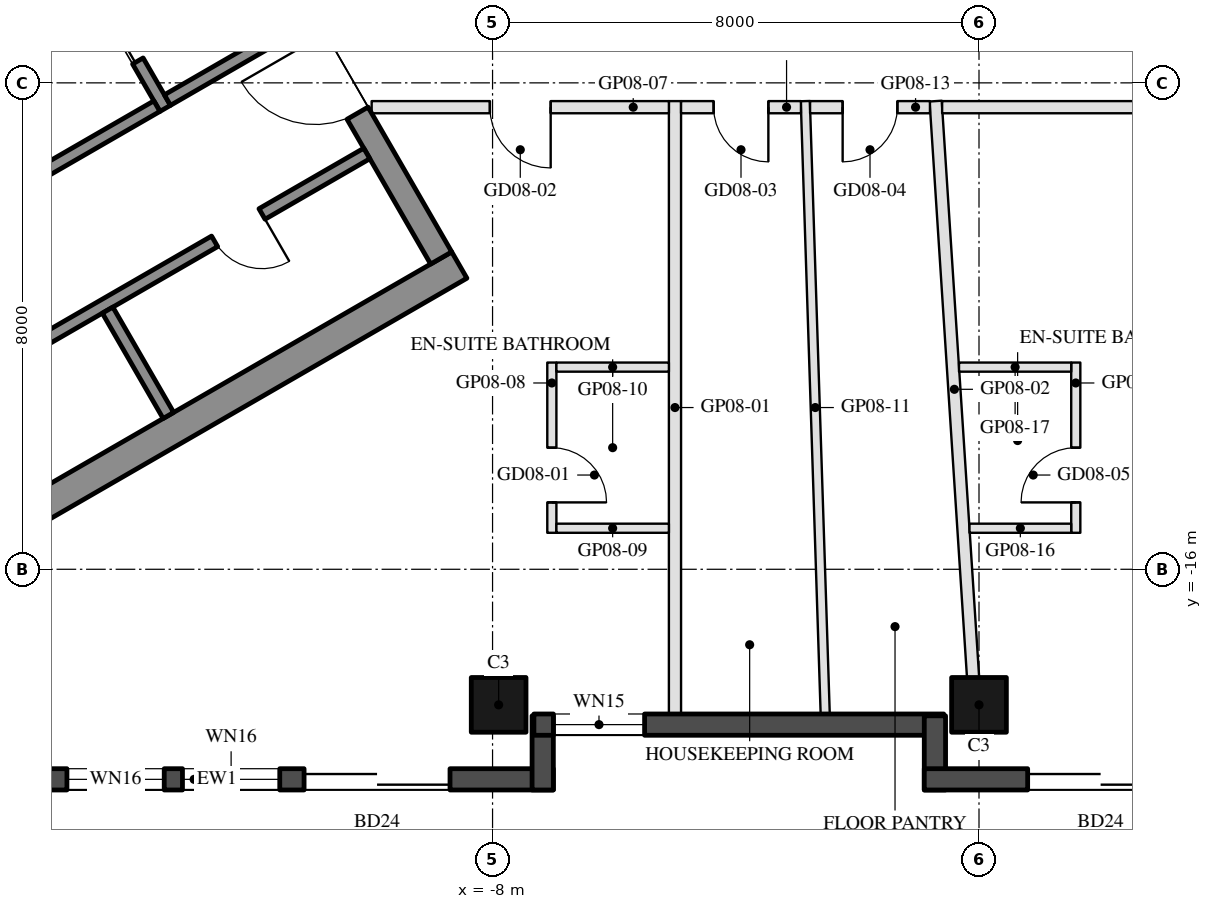
"""IFC4 building model, lengths in metres.
Left out: names, types, materials, properties, quantities, classifications, styles, units other than length and angle.
Written with IfcOpenShell. Run it as: python <this file> out.ifc"""

import sys

from ifc_helpers import new_model, si_unit, direction, frame, frame_2d, origin, origin_2d, place, context, subcontext, project, spatial, rectangle, hollow_rectangle, extrude, element, fill, save


model = new_model("IFC4")
c1 = context("Model", 3, precision=1e-05, world=origin(), true_north=direction((0.0, 1.0)))
c2 = subcontext(c1, "Body", "Model", "MODEL_VIEW")
j1 = project(units=[si_unit("LENGTHUNIT", "METRE"), si_unit("PLANEANGLEUNIT", "RADIAN")], contexts=[c1])
p1 = place(None, origin())
s1 = spatial("IfcSite", under=j1, at=p1, CompositionType="ELEMENT")
p2 = place(p1, origin())
s2 = spatial("IfcBuilding", under=s1, at=p2, CompositionType="ELEMENT")
p3 = place(p2, frame((0.0, 0.0, 105.7)))
s3 = spatial("IfcBuildingStorey", under=s2, at=p3, CompositionType="ELEMENT", Elevation=105.7)
for number, where, z_axis, x_axis in (
    (1, (-7.9, -18.23, 0.0), (0.0, 0.0, 1.0), (-1.0, 0.0, 0.0)),
    (2, (0.0, -18.23, 0.0), (0.0, 0.0, 1.0), (-1.0, 0.0, 0.0)),
):
    element("IfcColumn", number, at=place(p3, frame(where, z_axis=z_axis, x_axis=x_axis)), inside=s3, PredefinedType="COLUMN", context=c2, shape_type="SweptSolid", body=[
        extrude(hollow_rectangle(XDim=0.9, YDim=0.9, WallThickness=0.04, at=origin_2d()), origin(), (0.0, 0.0, 1.0), 3.7),
    ])
p4 = place(p3, frame((-18.816, -19.455, 0.0), z_axis=(0.0, 0.0, 1.0), x_axis=(1.0, 0.0, 0.0)))
e3 = element("IfcWall", 3, at=p4, inside=s3, PredefinedType="SOLIDWALL", context=c2, shape_type="SweptSolid", body=[
    extrude(rectangle(XDim=11.816, YDim=0.35, at=frame_2d((5.908, 0.0))), origin(), (0.0, 0.0, 1.0), 3.55),
])
p5 = place(p4, frame((0.381, 0.0, 0.3)))
e4 = element("IfcOpeningElement", 4, at=p5, cuts=e3, PredefinedType="OPENING", context=c2, shape_type="SweptSolid", body=[
    extrude(rectangle(XDim=1.8, YDim=2.65, at=frame_2d((0.9, 1.325))), frame((0.0, 0.185, 0.0), z_axis=(0.0, -1.0, 0.0), x_axis=(1.0, 0.0, 0.0)), (0.0, 0.0, 1.0), 0.37),
])
p6 = place(p4, frame((7.716, 0.0, 0.0)))
e5 = element("IfcOpeningElement", 5, at=p6, cuts=e3, PredefinedType="OPENING", context=c2, shape_type="SweptSolid", body=[
    extrude(rectangle(XDim=2.4, YDim=2.4, at=frame_2d((1.2, 1.2))), frame((0.0, 0.185, 0.0), z_axis=(0.0, -1.0, 0.0), x_axis=(1.0, 0.0, 0.0)), (0.0, 0.0, 1.0), 0.37),
])
p7 = place(p4, frame((3.816, 0.0, 0.3)))
e6 = element("IfcOpeningElement", 6, at=p7, cuts=e3, PredefinedType="OPENING", context=c2, shape_type="SweptSolid", body=[
    extrude(rectangle(XDim=1.6, YDim=2.65, at=frame_2d((0.8, 1.325))), frame((0.0, 0.185, 0.0), z_axis=(0.0, -1.0, 0.0), x_axis=(1.0, 0.0, 0.0)), (0.0, 0.0, 1.0), 0.37),
])
p8 = place(p4, frame((5.716, 0.0, 0.3)))
e7 = element("IfcOpeningElement", 7, at=p8, cuts=e3, PredefinedType="OPENING", context=c2, shape_type="SweptSolid", body=[
    extrude(rectangle(XDim=1.6, YDim=2.65, at=frame_2d((0.8, 1.325))), frame((0.0, 0.185, 0.0), z_axis=(0.0, -1.0, 0.0), x_axis=(1.0, 0.0, 0.0)), (0.0, 0.0, 1.0), 0.37),
])
p9 = place(p3, frame((-7.175, -19.63, 0.0), z_axis=(0.0, 0.0, 1.0), x_axis=(0.0, 1.0, 0.0)))
e8 = element("IfcWall", 8, at=p9, inside=s3, PredefinedType="SOLIDWALL", context=c2, shape_type="SweptSolid", body=[
    extrude(rectangle(XDim=1.22, YDim=0.35, at=frame_2d((0.61, 0.0))), origin(), (0.0, 0.0, 1.0), 3.55),
])
p10 = place(p3, frame((-7.32, -18.555, 0.0), z_axis=(0.0, 0.0, 1.0), x_axis=(1.0, 0.0, 0.0)))
e9 = element("IfcWall", 9, at=p10, inside=s3, PredefinedType="SOLIDWALL", context=c2, shape_type="SweptSolid", body=[
    extrude(rectangle(XDim=6.74, YDim=0.35, at=frame_2d((3.37, 0.0))), origin(), (0.0, 0.0, 1.0), 3.55),
])
p11 = place(p10, frame((0.32, 0.0, 0.3)))
e10 = element("IfcOpeningElement", 10, at=p11, cuts=e9, PredefinedType="OPENING", context=c2, shape_type="SweptSolid", body=[
    extrude(rectangle(XDim=1.5, YDim=2.65, at=frame_2d((0.75, 1.325))), frame((0.0, 0.185, 0.0), z_axis=(0.0, -1.0, 0.0), x_axis=(1.0, 0.0, 0.0)), (0.0, 0.0, 1.0), 0.37),
])
p12 = place(p3, frame((-0.725, -18.41, 0.0), z_axis=(0.0, 0.0, 1.0), x_axis=(0.0, -1.0, 0.0)))
e11 = element("IfcWall", 11, at=p12, inside=s3, PredefinedType="SOLIDWALL", context=c2, shape_type="SweptSolid", body=[
    extrude(rectangle(XDim=1.22, YDim=0.35, at=frame_2d((0.61, 0.0))), origin(), (0.0, 0.0, 1.0), 3.55),
])
p13 = place(p3, frame((-0.9, -19.455, 0.0), z_axis=(0.0, 0.0, 1.0), x_axis=(1.0, 0.0, 0.0)))
e12 = element("IfcWall", 12, at=p13, inside=s3, PredefinedType="SOLIDWALL", context=c2, shape_type="SweptSolid", body=[
    extrude(rectangle(XDim=9.7, YDim=0.35, at=frame_2d((4.85, 0.0))), origin(), (0.0, 0.0, 1.0), 3.55),
])
p14 = place(p13, frame((1.7, 0.0, 0.0)))
e13 = element("IfcOpeningElement", 13, at=p14, cuts=e12, PredefinedType="OPENING", context=c2, shape_type="SweptSolid", body=[
    extrude(rectangle(XDim=2.4, YDim=2.4, at=frame_2d((1.2, 1.2))), frame((0.0, 0.185, 0.0), z_axis=(0.0, -1.0, 0.0), x_axis=(1.0, 0.0, 0.0)), (0.0, 0.0, 1.0), 0.37),
])
p15 = place(p13, frame((4.4, 0.0, 0.3)))
e14 = element("IfcOpeningElement", 14, at=p15, cuts=e12, PredefinedType="OPENING", context=c2, shape_type="SweptSolid", body=[
    extrude(rectangle(XDim=1.6, YDim=2.65, at=frame_2d((0.8, 1.325))), frame((0.0, 0.185, 0.0), z_axis=(0.0, -1.0, 0.0), x_axis=(1.0, 0.0, 0.0)), (0.0, 0.0, 1.0), 0.37),
])
p16 = place(p13, frame((6.3, 0.0, 0.3)))
e15 = element("IfcOpeningElement", 15, at=p16, cuts=e12, PredefinedType="OPENING", context=c2, shape_type="SweptSolid", body=[
    extrude(rectangle(XDim=1.6, YDim=2.65, at=frame_2d((0.8, 1.325))), frame((0.0, 0.185, 0.0), z_axis=(0.0, -1.0, 0.0), x_axis=(1.0, 0.0, 0.0)), (0.0, 0.0, 1.0), 0.37),
])
for number, where, z_axis, x_axis in (
    (16, (-13.797, -1.903, 0.0), (0.0, 0.0, 1.0), (-0.866, -0.5, 0.0)),
    (17, (-8.547, -10.997, 0.0), (0.0, 0.0, 1.0), (-0.866, -0.5, 0.0)),
):
    element("IfcWall", number, at=place(p3, frame(where, z_axis=z_axis, x_axis=x_axis)), inside=s3, PredefinedType="SHEAR", context=c2, shape_type="SweptSolid", body=[
        extrude(rectangle(XDim=14.837, YDim=0.5, at=frame_2d((7.418, 0.0))), origin(), (0.0, 0.0, 1.0), 3.5),
    ])
p17 = place(p3, frame((-13.845, -2.22, 0.0), z_axis=(0.0, 0.0, 1.0), x_axis=(0.500004234368, -0.866022959057, 0.0)))
e18 = element("IfcWall", 18, at=p17, inside=s3, PredefinedType="SHEAR", context=c2, shape_type="SweptSolid", body=[
    extrude(rectangle(XDim=10.0, YDim=0.4, at=frame_2d((5.0, 0.0))), origin(), (0.0, 0.0, 1.0), 3.5),
])
p18 = place(p17, frame((3.55, 0.0, 0.0)))
e19 = element("IfcOpeningElement", 19, at=p18, cuts=e18, PredefinedType="OPENING", context=c2, shape_type="SweptSolid", body=[
    extrude(rectangle(XDim=1.1, YDim=2.1, at=frame_2d((0.55, 1.05))), frame((0.0, 0.21, 0.0), z_axis=(0.0, -1.0, 0.0), x_axis=(1.0, 0.0, 0.0)), (0.0, 0.0, 1.0), 0.42),
])
p19 = place(p17, frame((5.85, 0.0, 0.0)))
e20 = element("IfcOpeningElement", 20, at=p19, cuts=e18, PredefinedType="OPENING", context=c2, shape_type="SweptSolid", body=[
    extrude(rectangle(XDim=1.4, YDim=2.1, at=frame_2d((0.7, 1.05))), frame((0.0, 0.21, 0.0), z_axis=(0.0, -1.0, 0.0), x_axis=(1.0, 0.0, 0.0)), (0.0, 0.0, 1.0), 0.42),
])
p20 = place(p3, frame((-12.681, -4.636, 0.0), z_axis=(0.0, 0.0, 1.0), x_axis=(-0.866021702275, -0.500006411147, 0.0)))
e21 = element("IfcWall", 21, at=p20, inside=s3, PredefinedType="SHEAR", context=c2, shape_type="SweptSolid", body=[
    extrude(rectangle(XDim=6.45, YDim=0.25, at=frame_2d((3.225, 0.0))), origin(), (0.0, 0.0, 1.0), 3.5),
])
p21 = place(p20, frame((0.3, 0.0, 0.0)))
e22 = element("IfcOpeningElement", 22, at=p21, cuts=e21, PredefinedType="OPENING", context=c2, shape_type="SweptSolid", body=[
    extrude(rectangle(XDim=1.0, YDim=2.1, at=frame_2d((0.5, 1.05))), frame((0.0, 0.135, 0.0), z_axis=(0.0, -1.0, 0.0), x_axis=(1.0, 0.0, 0.0)), (0.0, 0.0, 1.0), 0.27),
])
p22 = place(p3, frame((-14.783, -5.995, 0.0), z_axis=(0.0, 0.0, 1.0), x_axis=(0.49994636267, -0.866056369097, 0.0)))
e23 = element("IfcWall", 23, at=p22, inside=s3, PredefinedType="SHEAR", context=c2, shape_type="SweptSolid", body=[
    extrude(rectangle(XDim=2.8, YDim=0.2, at=frame_2d((1.4, 0.0))), origin(), (0.0, 0.0, 1.0), 3.5),
])
p23 = place(p22, frame((0.7, 0.0, 0.0)))
e24 = element("IfcOpeningElement", 24, at=p23, cuts=e23, PredefinedType="OPENING", context=c2, shape_type="SweptSolid", body=[
    extrude(rectangle(XDim=1.2, YDim=2.1, at=frame_2d((0.6, 1.05))), frame((0.0, 0.11, 0.0), z_axis=(0.0, -1.0, 0.0), x_axis=(1.0, 0.0, 0.0)), (0.0, 0.0, 1.0), 0.22),
])
p24 = place(p3, frame((-13.52, -8.383, 0.0), z_axis=(0.0, 0.0, 1.0), x_axis=(-0.866034573852, -0.49998411664, 0.0)))
e25 = element("IfcWall", 25, at=p24, inside=s3, PredefinedType="SHEAR", context=c2, shape_type="SweptSolid", body=[
    extrude(rectangle(XDim=2.8, YDim=0.2, at=frame_2d((1.4, 0.0))), origin(), (0.0, 0.0, 1.0), 3.5),
])
p25 = place(p3, frame((-11.268, -7.083, 0.0), z_axis=(0.0, 0.0, 1.0), x_axis=(-0.866050077142, -0.499957262057, 0.0)))
e26 = element("IfcWall", 26, at=p25, inside=s3, PredefinedType="SHEAR", context=c2, shape_type="SweptSolid", body=[
    extrude(rectangle(XDim=2.4, YDim=0.2, at=frame_2d((1.2, 0.0))), origin(), (0.0, 0.0, 1.0), 3.5),
])
p26 = place(p3, frame((-10.068, -9.162, 0.0), z_axis=(0.0, 0.0, 1.0), x_axis=(-0.866032725843, -0.499987317609, 0.0)))
e27 = element("IfcWall", 27, at=p26, inside=s3, PredefinedType="SHEAR", context=c2, shape_type="SweptSolid", body=[
    extrude(rectangle(XDim=10.16, YDim=0.2, at=frame_2d((5.08, 0.0))), origin(), (0.0, 0.0, 1.0), 3.5),
])
p27 = place(p26, frame((1.99, 0.0, 0.0)))
e28 = element("IfcOpeningElement", 28, at=p27, cuts=e27, PredefinedType="OPENING", context=c2, shape_type="SweptSolid", body=[
    extrude(rectangle(XDim=0.9, YDim=2.1, at=frame_2d((0.45, 1.05))), frame((0.0, 0.11, 0.0), z_axis=(0.0, -1.0, 0.0), x_axis=(1.0, 0.0, 0.0)), (0.0, 0.0, 1.0), 0.22),
])
p28 = place(p26, frame((7.07, 0.0, 0.0)))
e29 = element("IfcOpeningElement", 29, at=p28, cuts=e27, PredefinedType="OPENING", context=c2, shape_type="SweptSolid", body=[
    extrude(rectangle(XDim=0.9, YDim=2.1, at=frame_2d((0.45, 1.05))), frame((0.0, 0.11, 0.0), z_axis=(0.0, -1.0, 0.0), x_axis=(1.0, 0.0, 0.0)), (0.0, 0.0, 1.0), 0.22),
])
p29 = place(p3, frame((-14.331, -11.738, 0.0), z_axis=(0.0, 0.0, 1.0), x_axis=(0.499972520799, -0.866041268327, 0.0)))
e30 = element("IfcWall", 30, at=p29, inside=s3, PredefinedType="SHEAR", context=c2, shape_type="SweptSolid", body=[
    extrude(rectangle(XDim=2.0, YDim=0.2, at=frame_2d((1.0, 0.0))), origin(), (0.0, 0.0, 1.0), 3.5),
])
p30 = place(p3, frame((-5.0, -18.38, 0.0), z_axis=(0.0, 0.0, 1.0), x_axis=(0.0, 1.0, 0.0)))
e31 = element("IfcWall", 31, at=p30, inside=s3, PredefinedType="PARTITIONING", context=c2, shape_type="SweptSolid", body=[
    extrude(rectangle(XDim=10.08, YDim=0.2, at=frame_2d((5.04, 0.0))), origin(), (0.0, 0.0, 1.0), 2.96),
])
p31 = place(p3, frame((-0.097, -17.78, 0.0), z_axis=(0.0, 0.0, 1.0), x_axis=(-0.064787627283, 0.997899074732, 0.0)))
e32 = element("IfcWall", 32, at=p31, inside=s3, PredefinedType="PARTITIONING", context=c2, shape_type="SweptSolid", body=[
    extrude(rectangle(XDim=9.5, YDim=0.2, at=frame_2d((4.75, 0.0))), origin(), (0.0, 0.0, 1.0), 2.95),
])
p32 = place(p3, frame((-5.1, -8.4, 0.0), z_axis=(0.0, 0.0, 1.0), x_axis=(-1.0, 0.0, 0.0)))
e33 = element("IfcWall", 33, at=p32, inside=s3, PredefinedType="PARTITIONING", context=c2, shape_type="SweptSolid", body=[
    extrude(rectangle(XDim=4.888, YDim=0.2, at=frame_2d((2.444, 0.0))), origin(), (0.0, 0.0, 1.0), 2.95),
])
p33 = place(p32, frame((1.944, 0.0, 0.0)))
e34 = element("IfcOpeningElement", 34, at=p33, cuts=e33, PredefinedType="OPENING", context=c2, shape_type="SweptSolid", body=[
    extrude(rectangle(XDim=1.0, YDim=2.1, at=frame_2d((0.5, 1.05))), frame((0.0, 0.11, 0.0), z_axis=(0.0, -1.0, 0.0), x_axis=(1.0, 0.0, 0.0)), (0.0, 0.0, 1.0), 0.22),
])
p34 = place(p3, frame((-7.025, -12.6, 0.0), z_axis=(0.0, 0.0, 1.0), x_axis=(0.0, -1.0, 0.0)))
e35 = element("IfcWall", 35, at=p34, inside=s3, PredefinedType="PARTITIONING", context=c2, shape_type="SweptSolid", body=[
    extrude(rectangle(XDim=2.8, YDim=0.15, at=frame_2d((1.4, 0.0))), origin(), (0.0, 0.0, 1.0), 3.55),
])
p35 = place(p34, frame((1.4, 0.0, 0.0)))
e36 = element("IfcOpeningElement", 36, at=p35, cuts=e35, PredefinedType="OPENING", context=c2, shape_type="SweptSolid", body=[
    extrude(rectangle(XDim=0.9, YDim=2.1, at=frame_2d((0.45, 1.05))), frame((0.0, 0.085, 0.0), z_axis=(0.0, -1.0, 0.0), x_axis=(1.0, 0.0, 0.0)), (0.0, 0.0, 1.0), 0.17),
])
for number, where, z_axis, x_axis in (
    (37, (-6.95, -15.325, 0.0), (0.0, 0.0, 1.0), (1.0, 0.0, 0.0)),
    (38, (-6.95, -12.675, 0.0), (0.0, 0.0, 1.0), (1.0, 0.0, 0.0)),
):
    element("IfcWall", number, at=place(p3, frame(where, z_axis=z_axis, x_axis=x_axis)), inside=s3, PredefinedType="PARTITIONING", context=c2, shape_type="SweptSolid", body=[
        extrude(rectangle(XDim=1.85, YDim=0.15, at=frame_2d((0.925, 0.0))), origin(), (0.0, 0.0, 1.0), 3.55),
    ])
p36 = place(p3, frame((-2.529, -18.38, 0.0), z_axis=(0.0, 0.0, 1.0), x_axis=(-0.032438656137, 0.999473728313, 0.0)))
e39 = element("IfcWall", 39, at=p36, inside=s3, PredefinedType="PARTITIONING", context=c2, shape_type="SweptSolid", body=[
    extrude(rectangle(XDim=10.085, YDim=0.15, at=frame_2d((5.042, 0.0))), origin(), (0.0, 0.0, 1.0), 2.96),
])
p37 = place(p3, frame((-2.928, -8.4, 0.0), z_axis=(0.0, 0.0, 1.0), x_axis=(-1.0, 0.0, 0.0)))
e40 = element("IfcWall", 40, at=p37, inside=s3, PredefinedType="PARTITIONING", context=c2, shape_type="SweptSolid", body=[
    extrude(rectangle(XDim=1.972, YDim=0.2, at=frame_2d((0.986, 0.0))), origin(), (0.0, 0.0, 1.0), 2.95),
])
p38 = place(p37, frame((0.536, 0.0, 0.0)))
e41 = element("IfcOpeningElement", 41, at=p38, cuts=e40, PredefinedType="OPENING", context=c2, shape_type="SweptSolid", body=[
    extrude(rectangle(XDim=0.9, YDim=2.1, at=frame_2d((0.45, 1.05))), frame((0.0, 0.11, 0.0), z_axis=(0.0, -1.0, 0.0), x_axis=(1.0, 0.0, 0.0)), (0.0, 0.0, 1.0), 0.22),
])
p39 = place(p3, frame((-0.807, -8.4, 0.0), z_axis=(0.0, 0.0, 1.0), x_axis=(-1.0, 0.0, 0.0)))
e42 = element("IfcWall", 42, at=p39, inside=s3, PredefinedType="PARTITIONING", context=c2, shape_type="SweptSolid", body=[
    extrude(rectangle(XDim=1.972, YDim=0.2, at=frame_2d((0.986, 0.0))), origin(), (0.0, 0.0, 1.0), 3.55),
])
p40 = place(p39, frame((0.536, 0.0, 0.0)))
e43 = element("IfcOpeningElement", 43, at=p40, cuts=e42, PredefinedType="OPENING", context=c2, shape_type="SweptSolid", body=[
    extrude(rectangle(XDim=0.9, YDim=2.1, at=frame_2d((0.45, 1.05))), frame((0.0, 0.11, 0.0), z_axis=(0.0, -1.0, 0.0), x_axis=(1.0, 0.0, 0.0)), (0.0, 0.0, 1.0), 0.22),
])
p41 = place(p3, frame((9.988, -8.4, 0.0), z_axis=(0.0, 0.0, 1.0), x_axis=(-1.0, 0.0, 0.0)))
e44 = element("IfcWall", 44, at=p41, inside=s3, PredefinedType="PARTITIONING", context=c2, shape_type="SweptSolid", body=[
    extrude(rectangle(XDim=10.594, YDim=0.2, at=frame_2d((5.297, 0.0))), origin(), (0.0, 0.0, 1.0), 2.95),
])
p42 = place(p41, frame((4.797, 0.0, 0.0)))
e45 = element("IfcOpeningElement", 45, at=p42, cuts=e44, PredefinedType="OPENING", context=c2, shape_type="SweptSolid", body=[
    extrude(rectangle(XDim=1.0, YDim=2.1, at=frame_2d((0.5, 1.05))), frame((0.0, 0.11, 0.0), z_axis=(0.0, -1.0, 0.0), x_axis=(1.0, 0.0, 0.0)), (0.0, 0.0, 1.0), 0.22),
])
p43 = place(p3, frame((1.591, -15.4, 0.0), z_axis=(0.0, 0.0, 1.0), x_axis=(0.0, 1.0, 0.0)))
e46 = element("IfcWall", 46, at=p43, inside=s3, PredefinedType="PARTITIONING", context=c2, shape_type="SweptSolid", body=[
    extrude(rectangle(XDim=2.8, YDim=0.15, at=frame_2d((1.4, 0.0))), origin(), (0.0, 0.0, 1.0), 3.55),
])
p44 = place(p43, frame((0.5, 0.0, 0.0)))
e47 = element("IfcOpeningElement", 47, at=p44, cuts=e46, PredefinedType="OPENING", context=c2, shape_type="SweptSolid", body=[
    extrude(rectangle(XDim=0.9, YDim=2.1, at=frame_2d((0.45, 1.05))), frame((0.0, 0.085, 0.0), z_axis=(0.0, -1.0, 0.0), x_axis=(1.0, 0.0, 0.0)), (0.0, 0.0, 1.0), 0.17),
])
p45 = place(p3, frame((-0.156, -15.325, 0.0), z_axis=(0.0, 0.0, 1.0), x_axis=(1.0, 0.0, 0.0)))
e48 = element("IfcWall", 48, at=p45, inside=s3, PredefinedType="PARTITIONING", context=c2, shape_type="SweptSolid", body=[
    extrude(rectangle(XDim=1.673, YDim=0.15, at=frame_2d((0.836, 0.0))), origin(), (0.0, 0.0, 1.0), 2.95),
])
p46 = place(p3, frame((-0.329, -12.675, 0.0), z_axis=(0.0, 0.0, 1.0), x_axis=(1.0, 0.0, 0.0)))
e49 = element("IfcWall", 49, at=p46, inside=s3, PredefinedType="PARTITIONING", context=c2, shape_type="SweptSolid", body=[
    extrude(rectangle(XDim=1.845, YDim=0.15, at=frame_2d((0.922, 0.0))), origin(), (0.0, 0.0, 1.0), 2.95),
])
p47 = place(p6, frame((2.4, 0.0, 0.0), z_axis=(0.0, 0.0, 1.0), x_axis=(-1.0, 0.0, 0.0)))
e50 = element("IfcDoor", 50, at=p47, inside=s3, OperationType="SLIDING_TO_LEFT", PredefinedType="DOOR", context=c2, shape_type="SweptSolid", body=[
    extrude(rectangle(XDim=2.4, YDim=2.4, at=frame_2d((1.2, 1.2))), frame((0.0, 0.025, 0.0), z_axis=(0.0, -1.0, 0.0), x_axis=(1.0, 0.0, 0.0)), (0.0, 0.0, 1.0), 0.05),
])
fill(e5, e50)
p48 = place(p7, origin())
e51 = element("IfcWindow", 51, at=p48, inside=s3, PartitioningType="SINGLE_PANEL", PredefinedType="WINDOW", context=c2, shape_type="SweptSolid", body=[
    extrude(rectangle(XDim=1.6, YDim=2.65, at=frame_2d((0.8, 1.325))), frame((0.0, 0.03, 0.0), z_axis=(0.0, -1.0, 0.0), x_axis=(1.0, 0.0, 0.0)), (0.0, 0.0, 1.0), 0.06),
])
fill(e6, e51)
p49 = place(p8, origin())
e52 = element("IfcWindow", 52, at=p49, inside=s3, PartitioningType="SINGLE_PANEL", PredefinedType="WINDOW", context=c2, shape_type="SweptSolid", body=[
    extrude(rectangle(XDim=1.6, YDim=2.65, at=frame_2d((0.8, 1.325))), frame((0.0, 0.03, 0.0), z_axis=(0.0, -1.0, 0.0), x_axis=(1.0, 0.0, 0.0)), (0.0, 0.0, 1.0), 0.06),
])
fill(e7, e52)
p50 = place(p11, origin())
e53 = element("IfcWindow", 53, at=p50, inside=s3, PartitioningType="SINGLE_PANEL", PredefinedType="WINDOW", context=c2, shape_type="SweptSolid", body=[
    extrude(rectangle(XDim=1.5, YDim=2.65, at=frame_2d((0.75, 1.325))), frame((0.0, 0.03, 0.0), z_axis=(0.0, -1.0, 0.0), x_axis=(1.0, 0.0, 0.0)), (0.0, 0.0, 1.0), 0.06),
])
fill(e10, e53)
p51 = place(p14, frame((2.4, 0.0, 0.0), z_axis=(0.0, 0.0, 1.0), x_axis=(-1.0, 0.0, 0.0)))
e54 = element("IfcDoor", 54, at=p51, inside=s3, OperationType="SLIDING_TO_LEFT", PredefinedType="DOOR", context=c2, shape_type="SweptSolid", body=[
    extrude(rectangle(XDim=2.4, YDim=2.4, at=frame_2d((1.2, 1.2))), frame((0.0, 0.025, 0.0), z_axis=(0.0, -1.0, 0.0), x_axis=(1.0, 0.0, 0.0)), (0.0, 0.0, 1.0), 0.05),
])
fill(e13, e54)
p52 = place(p23, origin())
e55 = element("IfcDoor", 55, at=p52, inside=s3, OperationType="DOUBLE_DOOR_SLIDING", PredefinedType="DOOR", context=c2, shape_type="SweptSolid", body=[
    extrude(rectangle(XDim=1.2, YDim=2.1, at=frame_2d((0.6, 1.05))), frame((0.0, 0.025, 0.0), z_axis=(0.0, -1.0, 0.0), x_axis=(1.0, 0.0, 0.0)), (0.0, 0.0, 1.0), 0.05),
])
fill(e24, e55)
p53 = place(p27, origin())
e56 = element("IfcDoor", 56, at=p53, inside=s3, OperationType="SINGLE_SWING_LEFT", PredefinedType="DOOR", context=c2, shape_type="SweptSolid", body=[
    extrude(rectangle(XDim=0.9, YDim=2.1, at=frame_2d((0.45, 1.05))), frame((0.0, 0.025, 0.0), z_axis=(0.0, -1.0, 0.0), x_axis=(1.0, 0.0, 0.0)), (0.0, 0.0, 1.0), 0.05),
])
fill(e28, e56)
p54 = place(p19, frame((1.4, 0.0, 0.0), z_axis=(0.0, 0.0, 1.0), x_axis=(-1.0, 0.0, 0.0)))
e57 = element("IfcDoor", 57, at=p54, inside=s3, OperationType="DOUBLE_DOOR_SINGLE_SWING", PredefinedType="DOOR", context=c2, shape_type="SweptSolid", body=[
    extrude(rectangle(XDim=1.4, YDim=2.1, at=frame_2d((0.7, 1.05))), frame((0.0, 0.025, 0.0), z_axis=(0.0, -1.0, 0.0), x_axis=(1.0, 0.0, 0.0)), (0.0, 0.0, 1.0), 0.05),
])
fill(e20, e57)
p55 = place(p35, origin())
e58 = element("IfcDoor", 58, at=p55, inside=s3, OperationType="SINGLE_SWING_RIGHT", PredefinedType="DOOR", context=c2, shape_type="SweptSolid", body=[
    extrude(rectangle(XDim=0.9, YDim=2.1, at=frame_2d((0.45, 1.05))), frame((0.0, 0.025, 0.0), z_axis=(0.0, -1.0, 0.0), x_axis=(1.0, 0.0, 0.0)), (0.0, 0.0, 1.0), 0.05),
])
fill(e36, e58)
p56 = place(p33, origin())
e59 = element("IfcDoor", 59, at=p56, inside=s3, OperationType="SINGLE_SWING_LEFT", PredefinedType="DOOR", context=c2, shape_type="SweptSolid", body=[
    extrude(rectangle(XDim=1.0, YDim=2.1, at=frame_2d((0.5, 1.05))), frame((0.0, 0.025, 0.0), z_axis=(0.0, -1.0, 0.0), x_axis=(1.0, 0.0, 0.0)), (0.0, 0.0, 1.0), 0.05),
])
fill(e34, e59)
p57 = place(p38, origin())
e60 = element("IfcDoor", 60, at=p57, inside=s3, OperationType="SINGLE_SWING_LEFT", PredefinedType="DOOR", context=c2, shape_type="SweptSolid", body=[
    extrude(rectangle(XDim=0.9, YDim=2.1, at=frame_2d((0.45, 1.05))), frame((0.0, 0.025, 0.0), z_axis=(0.0, -1.0, 0.0), x_axis=(1.0, 0.0, 0.0)), (0.0, 0.0, 1.0), 0.05),
])
fill(e41, e60)
p58 = place(p40, origin())
e61 = element("IfcDoor", 61, at=p58, inside=s3, OperationType="SINGLE_SWING_RIGHT", PredefinedType="DOOR", context=c2, shape_type="SweptSolid", body=[
    extrude(rectangle(XDim=0.9, YDim=2.1, at=frame_2d((0.45, 1.05))), frame((0.0, 0.025, 0.0), z_axis=(0.0, -1.0, 0.0), x_axis=(1.0, 0.0, 0.0)), (0.0, 0.0, 1.0), 0.05),
])
fill(e43, e61)
p59 = place(p44, origin())
e62 = element("IfcDoor", 62, at=p59, inside=s3, OperationType="SINGLE_SWING_LEFT", PredefinedType="DOOR", context=c2, shape_type="SweptSolid", body=[
    extrude(rectangle(XDim=0.9, YDim=2.1, at=frame_2d((0.45, 1.05))), frame((0.0, 0.025, 0.0), z_axis=(0.0, -1.0, 0.0), x_axis=(1.0, 0.0, 0.0)), (0.0, 0.0, 1.0), 0.05),
])
fill(e47, e62)
save(model, sys.argv[1])
